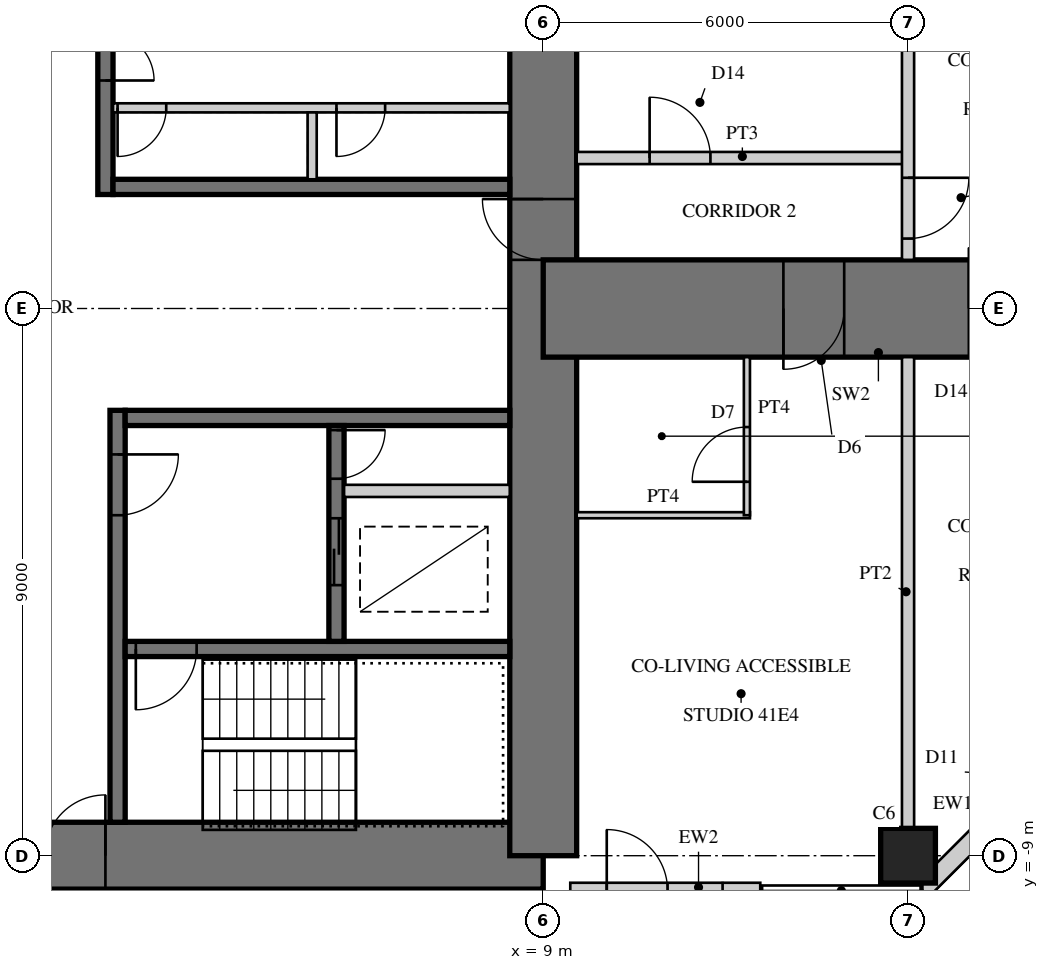
"""IFC4 building model, lengths in metres.
Left out: names, types, materials, properties, quantities, classifications, styles, units other than length and angle.
Written with IfcOpenShell. Run it as: python <this file> out.ifc"""

import sys

from ifc_helpers import new_model, si_unit, direction, frame, frame_2d, origin, origin_2d, place, context, subcontext, project, spatial, rectangle, hollow_rectangle, extrude, element, fill, save


model = new_model("IFC4")
c1 = context("Model", 3, precision=1e-05, world=origin(), true_north=direction((0.0, 1.0)))
c2 = subcontext(c1, "Body", "Model", "MODEL_VIEW")
j1 = project(units=[si_unit("LENGTHUNIT", "METRE"), si_unit("PLANEANGLEUNIT", "RADIAN")], contexts=[c1])
p1 = place(None, origin())
s1 = spatial("IfcSite", under=j1, at=p1, CompositionType="ELEMENT")
p2 = place(p1, origin())
s2 = spatial("IfcBuilding", under=s1, at=p2, CompositionType="ELEMENT")
p3 = place(p2, frame((0.0, 0.0, 169.5)))
s3 = spatial("IfcBuildingStorey", under=s2, at=p3, CompositionType="ELEMENT", Elevation=169.5)
p4 = place(p3, frame((-9.0, -9.0, 0.0), z_axis=(0.0, 0.0, 1.0), x_axis=(1.0, 0.0, 0.0)))
e1 = element("IfcWall", 1, at=p4, inside=s3, PredefinedType="SHEAR", context=c2, shape_type="SweptSolid", body=[
    extrude(rectangle(XDim=18.0, YDim=1.1, at=frame_2d((9.0, 0.0))), origin(), (0.0, 0.0, 1.0), 3.4),
])
p5 = place(p4, frame((9.8, 0.0, 0.0)))
e2 = element("IfcOpeningElement", 2, at=p5, cuts=e1, PredefinedType="OPENING", context=c2, shape_type="SweptSolid", body=[
    extrude(rectangle(XDim=1.0, YDim=2.4, at=frame_2d((0.5, 1.2))), frame((0.0, 0.56, 0.0), z_axis=(0.0, -1.0, 0.0), x_axis=(1.0, 0.0, 0.0)), (0.0, 0.0, 1.0), 1.12),
])
p6 = place(p3, frame((9.0, -9.0, 0.0), z_axis=(0.0, 0.0, 1.0), x_axis=(0.0, 1.0, 0.0)))
e3 = element("IfcWall", 3, at=p6, inside=s3, PredefinedType="SHEAR", context=c2, shape_type="SweptSolid", body=[
    extrude(rectangle(XDim=18.0, YDim=1.1, at=frame_2d((9.0, 0.0))), origin(), (0.0, 0.0, 1.0), 3.4),
])
p7 = place(p6, frame((9.8, 0.0, 0.0)))
e4 = element("IfcOpeningElement", 4, at=p7, cuts=e3, PredefinedType="OPENING", context=c2, shape_type="SweptSolid", body=[
    extrude(rectangle(XDim=1.0, YDim=2.4, at=frame_2d((0.5, 1.2))), frame((0.0, 0.56, 0.0), z_axis=(0.0, -1.0, 0.0), x_axis=(1.0, 0.0, 0.0)), (0.0, 0.0, 1.0), 1.12),
])
p8 = place(p3, frame((1.8, 1.875, 0.0), z_axis=(0.0, 0.0, 1.0), x_axis=(0.0, 1.0, 0.0)))
e5 = element("IfcWall", 5, at=p8, inside=s3, PredefinedType="SHEAR", context=c2, shape_type="SweptSolid", body=[
    extrude(rectangle(XDim=6.575, YDim=0.25, at=frame_2d((3.288, 0.0))), origin(), (0.0, 0.0, 1.0), 3.4),
])
p9 = place(p8, frame((1.875, 0.0, 0.0)))
e6 = element("IfcOpeningElement", 6, at=p9, cuts=e5, PredefinedType="OPENING", context=c2, shape_type="SweptSolid", body=[
    extrude(rectangle(XDim=1.6, YDim=2.4, at=frame_2d((0.8, 1.2))), frame((0.0, 0.135, 0.0), z_axis=(0.0, -1.0, 0.0), x_axis=(1.0, 0.0, 0.0)), (0.0, 0.0, 1.0), 0.27),
])
p10 = place(p3, frame((1.925, 2.0, 0.0), z_axis=(0.0, 0.0, 1.0), x_axis=(1.0, 0.0, 0.0)))
e7 = element("IfcWall", 7, at=p10, inside=s3, PredefinedType="SHEAR", context=c2, shape_type="SweptSolid", body=[
    extrude(rectangle(XDim=6.525, YDim=0.25, at=frame_2d((3.262, 0.0))), origin(), (0.0, 0.0, 1.0), 3.4),
])
p11 = place(p3, frame((1.925, 3.3, 0.0), z_axis=(0.0, 0.0, 1.0), x_axis=(1.0, 0.0, 0.0)))
e8 = element("IfcWall", 8, at=p11, inside=s3, PredefinedType="PARTITIONING", context=c2, shape_type="SweptSolid", body=[
    extrude(rectangle(XDim=6.525, YDim=0.15, at=frame_2d((3.262, 0.0))), origin(), (0.0, 0.0, 1.0), 3.4),
])
p12 = place(p11, frame((0.075, 0.0, 0.0)))
e9 = element("IfcOpeningElement", 9, at=p12, cuts=e8, PredefinedType="OPENING", context=c2, shape_type="SweptSolid", body=[
    extrude(rectangle(XDim=0.8, YDim=2.1, at=frame_2d((0.4, 1.05))), frame((0.0, 0.085, 0.0), z_axis=(0.0, -1.0, 0.0), x_axis=(1.0, 0.0, 0.0)), (0.0, 0.0, 1.0), 0.17),
])
p13 = place(p11, frame((3.675, 0.0, 0.0)))
e10 = element("IfcOpeningElement", 10, at=p13, cuts=e8, PredefinedType="OPENING", context=c2, shape_type="SweptSolid", body=[
    extrude(rectangle(XDim=0.8, YDim=2.1, at=frame_2d((0.4, 1.05))), frame((0.0, 0.085, 0.0), z_axis=(0.0, -1.0, 0.0), x_axis=(1.0, 0.0, 0.0)), (0.0, 0.0, 1.0), 0.17),
])
p14 = place(p3, frame((5.2, 2.125, 0.0), z_axis=(0.0, 0.0, 1.0), x_axis=(0.0, 1.0, 0.0)))
e11 = element("IfcWall", 11, at=p14, inside=s3, PredefinedType="PARTITIONING", context=c2, shape_type="SweptSolid", body=[
    extrude(rectangle(XDim=1.1, YDim=0.15, at=frame_2d((0.55, 0.0))), origin(), (0.0, 0.0, 1.0), 3.4),
])
p15 = place(p3, frame((2.0, -1.675, 0.0), z_axis=(0.0, 0.0, 1.0), x_axis=(0.0, -1.0, 0.0)))
e12 = element("IfcWall", 12, at=p15, inside=s3, PredefinedType="SHEAR", context=c2, shape_type="SweptSolid", body=[
    extrude(rectangle(XDim=6.775, YDim=0.25, at=frame_2d((3.387, 0.0))), origin(), (0.0, 0.0, 1.0), 3.4),
])
p16 = place(p15, frame((0.725, 0.0, 0.0)))
e13 = element("IfcOpeningElement", 13, at=p16, cuts=e12, PredefinedType="OPENING", context=c2, shape_type="SweptSolid", body=[
    extrude(rectangle(XDim=1.0, YDim=2.1, at=frame_2d((0.5, 1.05))), frame((0.0, 0.135, 0.0), z_axis=(0.0, -1.0, 0.0), x_axis=(1.0, 0.0, 0.0)), (0.0, 0.0, 1.0), 0.27),
])
p17 = place(p3, frame((2.125, -1.8, 0.0), z_axis=(0.0, 0.0, 1.0), x_axis=(1.0, 0.0, 0.0)))
e14 = element("IfcWall", 14, at=p17, inside=s3, PredefinedType="SHEAR", context=c2, shape_type="SweptSolid", body=[
    extrude(rectangle(XDim=6.325, YDim=0.25, at=frame_2d((3.163, 0.0))), origin(), (0.0, 0.0, 1.0), 3.4),
])
p18 = place(p3, frame((2.125, -5.6, 0.0), z_axis=(0.0, 0.0, 1.0), x_axis=(1.0, 0.0, 0.0)))
e15 = element("IfcWall", 15, at=p18, inside=s3, PredefinedType="SHEAR", context=c2, shape_type="SweptSolid", body=[
    extrude(rectangle(XDim=6.325, YDim=0.25, at=frame_2d((3.163, 0.0))), origin(), (0.0, 0.0, 1.0), 3.4),
])
p19 = place(p18, frame((0.175, 0.0, 0.0)))
e16 = element("IfcOpeningElement", 16, at=p19, cuts=e15, PredefinedType="OPENING", context=c2, shape_type="SweptSolid", body=[
    extrude(rectangle(XDim=1.0, YDim=2.1, at=frame_2d((0.5, 1.05))), frame((0.0, 0.135, 0.0), z_axis=(0.0, -1.0, 0.0), x_axis=(1.0, 0.0, 0.0)), (0.0, 0.0, 1.0), 0.27),
])
p20 = place(p3, frame((5.6, -1.925, 0.0), z_axis=(0.0, 0.0, 1.0), x_axis=(0.0, -1.0, 0.0)))
e17 = element("IfcWall", 17, at=p20, inside=s3, PredefinedType="SHEAR", context=c2, shape_type="SweptSolid", body=[
    extrude(rectangle(XDim=3.55, YDim=0.25, at=frame_2d((1.775, 0.0))), origin(), (0.0, 0.0, 1.0), 3.4),
])
p21 = place(p20, frame((1.525, 0.0, 0.0)))
e18 = element("IfcOpeningElement", 18, at=p21, cuts=e17, PredefinedType="OPENING", context=c2, shape_type="SweptSolid", body=[
    extrude(rectangle(XDim=1.1, YDim=2.2, at=frame_2d((0.55, 1.1))), frame((0.0, 0.135, 0.0), z_axis=(0.0, -1.0, 0.0), x_axis=(1.0, 0.0, 0.0)), (0.0, 0.0, 1.0), 0.27),
])
p22 = place(p20, frame((0.075, 0.0, 0.0)))
e19 = element("IfcOpeningElement", 19, at=p22, cuts=e17, PredefinedType="OPENING", context=c2, shape_type="SweptSolid", body=[
    extrude(rectangle(XDim=0.8, YDim=2.1, at=frame_2d((0.4, 1.05))), frame((0.0, 0.135, 0.0), z_axis=(0.0, -1.0, 0.0), x_axis=(1.0, 0.0, 0.0)), (0.0, 0.0, 1.0), 0.27),
])
p23 = place(p3, frame((5.725, -3.0, 0.0), z_axis=(0.0, 0.0, 1.0), x_axis=(1.0, 0.0, 0.0)))
e20 = element("IfcWall", 20, at=p23, inside=s3, PredefinedType="PARTITIONING", context=c2, shape_type="SweptSolid", body=[
    extrude(rectangle(XDim=2.725, YDim=0.2, at=frame_2d((1.362, 0.0))), origin(), (0.0, 0.0, 1.0), 3.4),
])
p24 = place(p3, frame((9.0, 0.0, 0.0), z_axis=(0.0, 0.0, 1.0), x_axis=(1.0, 0.0, 0.0)))
e21 = element("IfcWall", 21, at=p24, inside=s3, PredefinedType="SHEAR", context=c2, shape_type="SweptSolid", body=[
    extrude(rectangle(XDim=9.0, YDim=1.6, at=frame_2d((4.5, 0.0))), origin(), (0.0, 0.0, 1.0), 3.4),
])
p25 = place(p24, frame((3.95, 0.0, 0.0)))
e22 = element("IfcOpeningElement", 22, at=p25, cuts=e21, PredefinedType="OPENING", context=c2, shape_type="SweptSolid", body=[
    extrude(rectangle(XDim=1.0, YDim=2.15, at=frame_2d((0.5, 1.075))), frame((0.0, 0.81, 0.0), z_axis=(0.0, -1.0, 0.0), x_axis=(1.0, 0.0, 0.0)), (0.0, 0.0, 1.0), 1.62),
])
p26 = place(p24, frame((7.0, 0.0, 0.0)))
e23 = element("IfcOpeningElement", 23, at=p26, cuts=e21, PredefinedType="OPENING", context=c2, shape_type="SweptSolid", body=[
    extrude(rectangle(XDim=1.0, YDim=2.2, at=frame_2d((0.5, 1.1))), frame((0.0, 0.81, 0.0), z_axis=(0.0, -1.0, 0.0), x_axis=(1.0, 0.0, 0.0)), (0.0, 0.0, 1.0), 1.62),
])
p27 = place(p3, frame((15.0, -9.0, 0.0), z_axis=(0.0, 0.0, 1.0), x_axis=(1.0, 0.0, 0.0)))
e24 = element("IfcColumn", 24, at=p27, inside=s3, PredefinedType="COLUMN", context=c2, shape_type="SweptSolid", body=[
    extrude(rectangle(XDim=0.9, YDim=0.9, at=origin_2d()), origin(), (0.0, 0.0, 1.0), 3.4),
])
p28 = place(p3, frame((9.445, -9.57, 0.0), z_axis=(0.0, 0.0, 1.0), x_axis=(1.0, 0.0, 0.0)))
e25 = element("IfcWall", 25, at=p28, inside=s3, PredefinedType="SOLIDWALL", context=c2, shape_type="SweptSolid", body=[
    extrude(rectangle(XDim=3.125, YDim=0.25, at=frame_2d((1.562, 0.0))), origin(), (0.0, 0.0, 1.0), 3.22),
])
p29 = place(p28, frame((0.6, 0.0, 0.0)))
e26 = element("IfcOpeningElement", 26, at=p29, cuts=e25, PredefinedType="OPENING", context=c2, shape_type="SweptSolid", body=[
    extrude(rectangle(XDim=1.0, YDim=2.2, at=frame_2d((0.5, 1.1))), frame((0.0, 0.135, 0.0), z_axis=(0.0, -1.0, 0.0), x_axis=(1.0, 0.0, 0.0)), (0.0, 0.0, 1.0), 0.27),
])
p30 = place(p3, frame((15.236, -9.57, 0.0), z_axis=(0.0, 0.0, 1.0), x_axis=(0.707106781187, 0.707106781187, 0.0)))
e27 = element("IfcWall", 27, at=p30, inside=s3, PredefinedType="SOLIDWALL", context=c2, shape_type="SweptSolid", body=[
    extrude(rectangle(XDim=4.715, YDim=0.3, at=frame_2d((2.357, 0.0))), origin(), (0.0, 0.0, 1.0), 3.22),
])
p31 = place(p30, frame((2.15, 0.0, 0.0)))
e28 = element("IfcOpeningElement", 28, at=p31, cuts=e27, PredefinedType="OPENING", context=c2, shape_type="SweptSolid", body=[
    extrude(rectangle(XDim=1.0, YDim=2.4, at=frame_2d((0.5, 1.2))), frame((0.0, 0.16, 0.0), z_axis=(0.0, -1.0, 0.0), x_axis=(1.0, 0.0, 0.0)), (0.0, 0.0, 1.0), 0.32),
])
p32 = place(p3, frame((9.55, -3.4, 0.0), z_axis=(0.0, 0.0, 1.0), x_axis=(1.0, 0.0, 0.0)))
e29 = element("IfcWall", 29, at=p32, inside=s3, PredefinedType="PARTITIONING", context=c2, shape_type="SweptSolid", body=[
    extrude(rectangle(XDim=2.85, YDim=0.1, at=frame_2d((1.425, 0.0))), origin(), (0.0, 0.0, 1.0), 3.22),
])
p33 = place(p3, frame((12.35, -3.4, 0.0), z_axis=(0.0, 0.0, 1.0), x_axis=(0.0, 1.0, 0.0)))
e30 = element("IfcWall", 30, at=p33, inside=s3, PredefinedType="PARTITIONING", context=c2, shape_type="SweptSolid", body=[
    extrude(rectangle(XDim=2.6, YDim=0.1, at=frame_2d((1.3, 0.0))), origin(), (0.0, 0.0, 1.0), 3.22),
])
p34 = place(p33, frame((0.55, 0.0, 0.0)))
e31 = element("IfcOpeningElement", 31, at=p34, cuts=e30, PredefinedType="OPENING", context=c2, shape_type="SweptSolid", body=[
    extrude(rectangle(XDim=0.9, YDim=2.1, at=frame_2d((0.45, 1.05))), frame((0.0, 0.06, 0.0), z_axis=(0.0, -1.0, 0.0), x_axis=(1.0, 0.0, 0.0)), (0.0, 0.0, 1.0), 0.12),
])
p35 = place(p3, frame((9.55, 2.475, 0.0), z_axis=(0.0, 0.0, 1.0), x_axis=(1.0, 0.0, 0.0)))
e32 = element("IfcWall", 32, at=p35, inside=s3, PredefinedType="SOLIDWALL", context=c2, shape_type="SweptSolid", body=[
    extrude(rectangle(XDim=5.45, YDim=0.2, at=frame_2d((2.725, 0.0))), origin(), (0.0, 0.0, 1.0), 3.22),
])
p36 = place(p35, frame((1.2, 0.0, 0.0)))
e33 = element("IfcOpeningElement", 33, at=p36, cuts=e32, PredefinedType="OPENING", context=c2, shape_type="SweptSolid", body=[
    extrude(rectangle(XDim=1.0, YDim=2.2, at=frame_2d((0.5, 1.1))), frame((0.0, 0.11, 0.0), z_axis=(0.0, -1.0, 0.0), x_axis=(1.0, 0.0, 0.0)), (0.0, 0.0, 1.0), 0.22),
])
p37 = place(p3, frame((15.0, -8.55, 0.0), z_axis=(0.0, 0.0, 1.0), x_axis=(0.0, 1.0, 0.0)))
e34 = element("IfcWall", 34, at=p37, inside=s3, PredefinedType="SOLIDWALL", context=c2, shape_type="SweptSolid", body=[
    extrude(rectangle(XDim=7.75, YDim=0.2, at=frame_2d((3.875, 0.0))), origin(), (0.0, 0.0, 1.0), 2.47),
])
p38 = place(p3, frame((15.0, 0.8, 0.0), z_axis=(0.0, 0.0, 1.0), x_axis=(0.0, 1.0, 0.0)))
e35 = element("IfcWall", 35, at=p38, inside=s3, PredefinedType="SOLIDWALL", context=c2, shape_type="SweptSolid", body=[
    extrude(rectangle(XDim=7.75, YDim=0.2, at=frame_2d((3.875, 0.0))), origin(), (0.0, 0.0, 1.0), 2.47),
])
p39 = place(p38, frame((0.35, 0.0, 0.0)))
e36 = element("IfcOpeningElement", 36, at=p39, cuts=e35, PredefinedType="OPENING", context=c2, shape_type="SweptSolid", body=[
    extrude(rectangle(XDim=1.0, YDim=2.2, at=frame_2d((0.5, 1.1))), frame((0.0, 0.11, 0.0), z_axis=(0.0, -1.0, 0.0), x_axis=(1.0, 0.0, 0.0)), (0.0, 0.0, 1.0), 0.22),
])
p40 = place(p3, frame((4.775, -9.55, 0.0), z_axis=(0.0, 0.0, 1.0), x_axis=(0.0, -1.0, 0.0)))
e37 = element("IfcWall", 37, at=p40, inside=s3, PredefinedType="PARTITIONING", context=c2, shape_type="SweptSolid", body=[
    extrude(rectangle(XDim=3.1, YDim=0.1, at=frame_2d((1.55, 0.0))), origin(), (0.0, 0.0, 1.0), 3.22),
])
p41 = place(p29, origin())
e38 = element("IfcDoor", 38, at=p41, inside=s3, OperationType="SINGLE_SWING_LEFT", PredefinedType="DOOR", context=c2, shape_type="SweptSolid", body=[
    extrude(hollow_rectangle(XDim=1.0, YDim=2.2, WallThickness=0.06, at=frame_2d((0.5, 1.1))), frame((0.0, 0.025, 0.0), z_axis=(0.0, -1.0, 0.0), x_axis=(1.0, 0.0, 0.0)), (0.0, 0.0, 1.0), 0.05),
    extrude(rectangle(XDim=0.879, YDim=2.079, at=frame_2d((0.5, 1.1))), frame((0.0, 0.025, 0.0), z_axis=(0.0, -1.0, 0.0), x_axis=(1.0, 0.0, 0.0)), (0.0, 0.0, 1.0), 0.05),
])
fill(e26, e38)
p42 = place(p34, origin())
e39 = element("IfcDoor", 39, at=p42, inside=s3, OperationType="SINGLE_SWING_LEFT", PredefinedType="DOOR", context=c2, shape_type="SweptSolid", body=[
    extrude(rectangle(XDim=0.9, YDim=2.1, at=frame_2d((0.45, 1.05))), frame((0.0, 0.025, 0.0), z_axis=(0.0, -1.0, 0.0), x_axis=(1.0, 0.0, 0.0)), (0.0, 0.0, 1.0), 0.05),
])
fill(e31, e39)
p43 = place(p36, origin())
e40 = element("IfcDoor", 40, at=p43, inside=s3, OperationType="SINGLE_SWING_LEFT", PredefinedType="DOOR", context=c2, shape_type="SweptSolid", body=[
    extrude(rectangle(XDim=1.0, YDim=2.2, at=frame_2d((0.5, 1.1))), frame((0.0, 0.025, 0.0), z_axis=(0.0, -1.0, 0.0), x_axis=(1.0, 0.0, 0.0)), (0.0, 0.0, 1.0), 0.05),
])
fill(e33, e40)
p44 = place(p39, frame((1.0, 0.0, 0.0), z_axis=(0.0, 0.0, 1.0), x_axis=(-1.0, 0.0, 0.0)))
e41 = element("IfcDoor", 41, at=p44, inside=s3, OperationType="SINGLE_SWING_LEFT", PredefinedType="DOOR", context=c2, shape_type="SweptSolid", body=[
    extrude(rectangle(XDim=1.0, YDim=2.2, at=frame_2d((0.5, 1.1))), frame((0.0, 0.025, 0.0), z_axis=(0.0, -1.0, 0.0), x_axis=(1.0, 0.0, 0.0)), (0.0, 0.0, 1.0), 0.05),
])
fill(e36, e41)
p45 = place(p25, frame((1.0, 0.0, 0.0), z_axis=(0.0, 0.0, 1.0), x_axis=(-1.0, 0.0, 0.0)))
e42 = element("IfcDoor", 42, at=p45, inside=s3, OperationType="SINGLE_SWING_RIGHT", PredefinedType="DOOR", context=c2, shape_type="SweptSolid", body=[
    extrude(rectangle(XDim=1.0, YDim=2.15, at=frame_2d((0.5, 1.075))), frame((0.0, 0.025, 0.0), z_axis=(0.0, -1.0, 0.0), x_axis=(1.0, 0.0, 0.0)), (0.0, 0.0, 1.0), 0.05),
])
fill(e22, e42)
p46 = place(p5, origin())
e43 = element("IfcDoor", 43, at=p46, inside=s3, OperationType="SINGLE_SWING_RIGHT", PredefinedType="DOOR", context=c2, shape_type="SweptSolid", body=[
    extrude(rectangle(XDim=1.0, YDim=2.4, at=frame_2d((0.5, 1.2))), frame((0.0, 0.055, 0.0), z_axis=(0.0, -1.0, 0.0), x_axis=(1.0, 0.0, 0.0)), (0.0, 0.0, 1.0), 0.05),
])
fill(e2, e43)
p47 = place(p7, origin())
e44 = element("IfcDoor", 44, at=p47, inside=s3, OperationType="SINGLE_SWING_RIGHT", PredefinedType="DOOR", context=c2, shape_type="SweptSolid", body=[
    extrude(rectangle(XDim=1.0, YDim=2.4, at=frame_2d((0.5, 1.2))), frame((0.0, 0.055, 0.0), z_axis=(0.0, -1.0, 0.0), x_axis=(1.0, 0.0, 0.0)), (0.0, 0.0, 1.0), 0.05),
])
fill(e4, e44)
p48 = place(p9, frame((1.6, 0.0, 0.0), z_axis=(0.0, 0.0, 1.0), x_axis=(-1.0, 0.0, 0.0)))
e45 = element("IfcDoor", 45, at=p48, inside=s3, OperationType="DOUBLE_DOOR_SINGLE_SWING", PredefinedType="DOOR", context=c2, shape_type="SweptSolid", body=[
    extrude(rectangle(XDim=1.6, YDim=2.4, at=frame_2d((0.8, 1.2))), frame((0.0, 0.025, 0.0), z_axis=(0.0, -1.0, 0.0), x_axis=(1.0, 0.0, 0.0)), (0.0, 0.0, 1.0), 0.05),
])
fill(e6, e45)
p49 = place(p12, frame((0.8, 0.0, 0.0), z_axis=(0.0, 0.0, 1.0), x_axis=(-1.0, 0.0, 0.0)))
e46 = element("IfcDoor", 46, at=p49, inside=s3, OperationType="SINGLE_SWING_RIGHT", PredefinedType="DOOR", context=c2, shape_type="SweptSolid", body=[
    extrude(rectangle(XDim=0.8, YDim=2.1, at=frame_2d((0.4, 1.05))), frame((0.0, 0.025, 0.0), z_axis=(0.0, -1.0, 0.0), x_axis=(1.0, 0.0, 0.0)), (0.0, 0.0, 1.0), 0.05),
])
fill(e9, e46)
p50 = place(p13, frame((0.8, 0.0, 0.0), z_axis=(0.0, 0.0, 1.0), x_axis=(-1.0, 0.0, 0.0)))
e47 = element("IfcDoor", 47, at=p50, inside=s3, OperationType="SINGLE_SWING_RIGHT", PredefinedType="DOOR", context=c2, shape_type="SweptSolid", body=[
    extrude(rectangle(XDim=0.8, YDim=2.1, at=frame_2d((0.4, 1.05))), frame((0.0, 0.025, 0.0), z_axis=(0.0, -1.0, 0.0), x_axis=(1.0, 0.0, 0.0)), (0.0, 0.0, 1.0), 0.05),
])
fill(e10, e47)
p51 = place(p16, origin())
e48 = element("IfcDoor", 48, at=p51, inside=s3, OperationType="SINGLE_SWING_LEFT", PredefinedType="DOOR", context=c2, shape_type="SweptSolid", body=[
    extrude(rectangle(XDim=1.0, YDim=2.1, at=frame_2d((0.5, 1.05))), frame((0.0, 0.025, 0.0), z_axis=(0.0, -1.0, 0.0), x_axis=(1.0, 0.0, 0.0)), (0.0, 0.0, 1.0), 0.05),
])
fill(e13, e48)
p52 = place(p19, frame((1.0, 0.0, 0.0), z_axis=(0.0, 0.0, 1.0), x_axis=(-1.0, 0.0, 0.0)))
e49 = element("IfcDoor", 49, at=p52, inside=s3, OperationType="SINGLE_SWING_RIGHT", PredefinedType="DOOR", context=c2, shape_type="SweptSolid", body=[
    extrude(rectangle(XDim=1.0, YDim=2.1, at=frame_2d((0.5, 1.05))), frame((0.0, 0.025, 0.0), z_axis=(0.0, -1.0, 0.0), x_axis=(1.0, 0.0, 0.0)), (0.0, 0.0, 1.0), 0.05),
])
fill(e16, e49)
p53 = place(p21, origin())
e50 = element("IfcDoor", 50, at=p53, inside=s3, OperationType="DOUBLE_DOOR_SLIDING", PredefinedType="DOOR", context=c2, shape_type="SweptSolid", body=[
    extrude(rectangle(XDim=1.1, YDim=2.2, at=frame_2d((0.55, 1.1))), frame((0.0, 0.025, 0.0), z_axis=(0.0, -1.0, 0.0), x_axis=(1.0, 0.0, 0.0)), (0.0, 0.0, 1.0), 0.05),
])
fill(e18, e50)
p54 = place(p22, origin())
e51 = element("IfcDoor", 51, at=p54, inside=s3, OperationType="SINGLE_SWING_LEFT", PredefinedType="DOOR", context=c2, shape_type="SweptSolid", body=[
    extrude(rectangle(XDim=0.8, YDim=2.1, at=frame_2d((0.4, 1.05))), frame((0.0, 0.025, 0.0), z_axis=(0.0, -1.0, 0.0), x_axis=(1.0, 0.0, 0.0)), (0.0, 0.0, 1.0), 0.05),
])
fill(e19, e51)
save(model, sys.argv[1])
